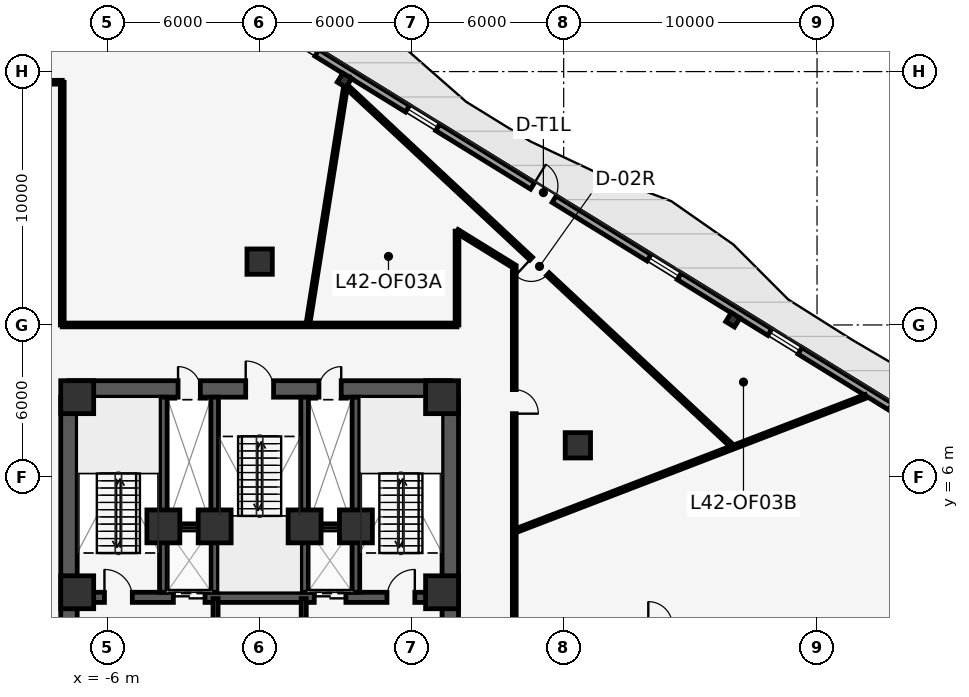
"""IFC4 building model, lengths in metres.
Left out: names, types, materials, properties, quantities, classifications, styles, units other than length and angle.
Written with IfcOpenShell. Run it as: python <this file> out.ifc"""

import sys

from ifc_helpers import new_model, si_unit, direction, frame, frame_2d, origin, origin_2d, place, context, subcontext, project, spatial, rectangle, i_section, extrude, element, fill, save


model = new_model("IFC4")
c1 = context("Model", 3, precision=1e-05, world=origin(), true_north=direction((0.0, 1.0)))
c2 = subcontext(c1, "Body", "Model", "MODEL_VIEW")
j1 = project(units=[si_unit("LENGTHUNIT", "METRE"), si_unit("PLANEANGLEUNIT", "RADIAN")], contexts=[c1])
p1 = place(None, origin())
s1 = spatial("IfcSite", under=j1, at=p1, CompositionType="ELEMENT")
p2 = place(p1, origin())
s2 = spatial("IfcBuilding", under=s1, at=p2, CompositionType="ELEMENT")
p3 = place(p2, frame((0.0, 0.0, 181.9)))
s3 = spatial("IfcBuildingStorey", under=s2, at=p3, CompositionType="ELEMENT", Elevation=181.9)
p4 = place(p3, frame((-7.525, 9.475, 0.0), z_axis=(0.0, 0.0, 1.0), x_axis=(1.0, 0.0, 0.0)))
e1 = element("IfcWall", 1, at=p4, inside=s3, PredefinedType="SHEAR", context=c2, shape_type="SweptSolid", body=[
    extrude(rectangle(XDim=15.05, YDim=0.65, at=frame_2d((7.525, 0.0))), origin(), (0.0, 0.0, 1.0), 3.85),
])
p5 = place(p4, frame((6.975, 0.0, 0.0)))
e2 = element("IfcOpeningElement", 2, at=p5, cuts=e1, PredefinedType="OPENING", context=c2, shape_type="SweptSolid", body=[
    extrude(rectangle(XDim=1.1, YDim=2.15, at=frame_2d((0.55, 1.075))), frame((0.0, 0.335, 0.0), z_axis=(0.0, -1.0, 0.0), x_axis=(1.0, 0.0, 0.0)), (0.0, 0.0, 1.0), 0.67),
])
p6 = place(p4, frame((4.305, 0.0, 0.0)))
e3 = element("IfcOpeningElement", 3, at=p6, cuts=e1, PredefinedType="OPENING", context=c2, shape_type="SweptSolid", body=[
    extrude(rectangle(XDim=0.88, YDim=2.15, at=frame_2d((0.44, 1.075))), frame((0.0, 0.335, 0.0), z_axis=(0.0, -1.0, 0.0), x_axis=(1.0, 0.0, 0.0)), (0.0, 0.0, 1.0), 0.67),
])
p7 = place(p4, frame((9.865, 0.0, 0.0)))
e4 = element("IfcOpeningElement", 4, at=p7, cuts=e1, PredefinedType="OPENING", context=c2, shape_type="SweptSolid", body=[
    extrude(rectangle(XDim=0.88, YDim=2.15, at=frame_2d((0.44, 1.075))), frame((0.0, 0.335, 0.0), z_axis=(0.0, -1.0, 0.0), x_axis=(1.0, 0.0, 0.0)), (0.0, 0.0, 1.0), 0.67),
])
p8 = place(p3, frame((-7.2, 1.25, 0.0), z_axis=(0.0, 0.0, 1.0), x_axis=(1.0, 0.0, 0.0)))
e5 = element("IfcWall", 5, at=p8, inside=s3, PredefinedType="SHEAR", context=c2, shape_type="SweptSolid", body=[
    extrude(rectangle(XDim=14.4, YDim=0.4, at=frame_2d((7.2, 0.0))), origin(), (0.0, 0.0, 1.0), 3.85),
])
p9 = place(p8, frame((3.795, 0.0, 0.0)))
e6 = element("IfcOpeningElement", 6, at=p9, cuts=e5, PredefinedType="OPENING", context=c2, shape_type="SweptSolid", body=[
    extrude(rectangle(XDim=1.25, YDim=2.25, at=frame_2d((0.625, 1.125))), frame((0.0, 0.21, 0.0), z_axis=(0.0, -1.0, 0.0), x_axis=(1.0, 0.0, 0.0)), (0.0, 0.0, 1.0), 0.42),
])
p10 = place(p8, frame((9.355, 0.0, 0.0)))
e7 = element("IfcOpeningElement", 7, at=p10, cuts=e5, PredefinedType="OPENING", context=c2, shape_type="SweptSolid", body=[
    extrude(rectangle(XDim=1.25, YDim=2.25, at=frame_2d((0.625, 1.125))), frame((0.0, 0.21, 0.0), z_axis=(0.0, -1.0, 0.0), x_axis=(1.0, 0.0, 0.0)), (0.0, 0.0, 1.0), 0.42),
])
p11 = place(p8, frame((1.075, 0.0, 0.0)))
e8 = element("IfcOpeningElement", 8, at=p11, cuts=e5, PredefinedType="OPENING", context=c2, shape_type="SweptSolid", body=[
    extrude(rectangle(XDim=1.1, YDim=2.15, at=frame_2d((0.55, 1.075))), frame((0.0, 0.21, 0.0), z_axis=(0.0, -1.0, 0.0), x_axis=(1.0, 0.0, 0.0)), (0.0, 0.0, 1.0), 0.42),
])
p12 = place(p8, frame((12.225, 0.0, 0.0)))
e9 = element("IfcOpeningElement", 9, at=p12, cuts=e5, PredefinedType="OPENING", context=c2, shape_type="SweptSolid", body=[
    extrude(rectangle(XDim=1.1, YDim=2.15, at=frame_2d((0.55, 1.075))), frame((0.0, 0.21, 0.0), z_axis=(0.0, -1.0, 0.0), x_axis=(1.0, 0.0, 0.0)), (0.0, 0.0, 1.0), 0.42),
])
for number, where, z_axis, x_axis in (
    (10, (-3.8, 1.45, 0.0), (0.0, 0.0, 1.0), (0.0, 1.0, 0.0)),
    (11, (-1.775, 1.45, 0.0), (0.0, 0.0, 1.0), (0.0, 1.0, 0.0)),
    (12, (1.775, 1.45, 0.0), (0.0, 0.0, 1.0), (0.0, 1.0, 0.0)),
    (13, (3.8, 1.45, 0.0), (0.0, 0.0, 1.0), (0.0, 1.0, 0.0)),
):
    element("IfcWall", number, at=place(p3, frame(where, z_axis=z_axis, x_axis=x_axis)), inside=s3, PredefinedType="SHEAR", context=c2, shape_type="SweptSolid", body=[
        extrude(rectangle(XDim=7.7, YDim=0.3, at=frame_2d((3.85, 0.0))), origin(), (0.0, 0.0, 1.0), 3.85),
    ])
for number, where, z_axis, x_axis in (
    (14, (-7.525, 0.1, 0.0), (0.0, 0.0, 1.0), (0.0, 1.0, 0.0)),
    (15, (7.525, 0.1, 0.0), (0.0, 0.0, 1.0), (0.0, 1.0, 0.0)),
):
    element("IfcWall", number, at=place(p3, frame(where, z_axis=z_axis, x_axis=x_axis)), inside=s3, PredefinedType="SHEAR", context=c2, shape_type="SweptSolid", body=[
        extrude(rectangle(XDim=9.05, YDim=0.65, at=frame_2d((4.525, 0.0))), origin(), (0.0, 0.0, 1.0), 3.85),
    ])
for number, where, z_axis, x_axis in (
    (16, (7.2, 1.45, 0.0), (0.0, 0.0, 1.0), (1.0, 0.0, 0.0)),
    (17, (7.2, 9.15, 0.0), (0.0, 0.0, 1.0), (1.0, 0.0, 0.0)),
    (18, (-7.2, 9.15, 0.0), (0.0, 0.0, 1.0), (1.0, 0.0, 0.0)),
    (19, (-7.2, 1.45, 0.0), (0.0, 0.0, 1.0), (1.0, 0.0, 0.0)),
    (20, (-3.8, 4.05, 0.0), (0.0, 0.0, 1.0), (1.0, 0.0, 0.0)),
    (21, (3.8, 4.05, 0.0), (0.0, 0.0, 1.0), (1.0, 0.0, 0.0)),
    (22, (-1.775, 4.05, 0.0), (0.0, 0.0, 1.0), (1.0, 0.0, 0.0)),
    (23, (1.775, 4.05, 0.0), (0.0, 0.0, 1.0), (1.0, 0.0, 0.0)),
):
    element("IfcColumn", number, at=place(p3, frame(where, z_axis=z_axis, x_axis=x_axis)), inside=s3, PredefinedType="COLUMN", context=c2, shape_type="SweptSolid", body=[
        extrude(rectangle(XDim=1.3, YDim=1.3, at=origin_2d()), origin(), (0.0, 0.0, 1.0), 4.1),
    ])
for number, where, z_axis, x_axis in (
    (24, (12.56, 7.25, 0.0), (0.0, 0.0, 1.0), (1.0, 0.0, 0.0)),
    (25, (0.0, 14.5, 0.0), (0.0, 0.0, 1.0), (1.0, 0.0, 0.0)),
):
    element("IfcColumn", number, at=place(p3, frame(where, z_axis=z_axis, x_axis=x_axis)), inside=s3, PredefinedType="COLUMN", context=c2, shape_type="SweptSolid", body=[
        extrude(rectangle(XDim=1.0, YDim=1.0, at=origin_2d()), origin(), (0.0, 0.0, 1.0), 4.1),
    ])
for number, where, z_axis, x_axis in (
    (26, (18.679, 12.203, 0.0), (0.0, 0.0, 1.0), (-0.851, 0.525, 0.0)),
    (27, (3.346, 21.655, 0.0), (0.0, 0.0, 1.0), (-0.851, 0.525, 0.0)),
):
    element("IfcColumn", number, at=place(p3, frame(where, z_axis=z_axis, x_axis=x_axis)), inside=s3, PredefinedType="COLUMN", context=c2, shape_type="SweptSolid", body=[
        extrude(i_section(OverallWidth=0.406, OverallDepth=0.417, WebThickness=0.03, FlangeThickness=0.048, at=origin_2d()), origin(), (0.0, 0.0, 1.0), 4.1),
    ])
p13 = place(p3, frame((-12.255, 31.689, 0.0), z_axis=(0.0, 0.0, 1.0), x_axis=(0.851166647402, -0.524895549944, 0.0)))
e28 = element("IfcWall", 28, at=p13, inside=s3, PredefinedType="STANDARD", context=c2, shape_type="SweptSolid", body=[
    extrude(rectangle(XDim=55.111, YDim=0.3, at=frame_2d((27.555, 0.0))), origin(), (0.0, 0.0, 1.0), 3.85),
])
p14 = place(p13, frame((27.055, 0.0, 0.0)))
e29 = element("IfcOpeningElement", 29, at=p14, cuts=e28, PredefinedType="OPENING", context=c2, shape_type="SweptSolid", body=[
    extrude(rectangle(XDim=1.0, YDim=2.15, at=frame_2d((0.5, 1.075))), frame((0.0, 0.16, 0.0), z_axis=(0.0, -1.0, 0.0), x_axis=(1.0, 0.0, 0.0)), (0.0, 0.0, 1.0), 0.32),
])
p15 = place(p13, frame((4.455, 0.0, 0.85)))
e30 = element("IfcOpeningElement", 30, at=p15, cuts=e28, PredefinedType="OPENING", context=c2, shape_type="SweptSolid", body=[
    extrude(rectangle(XDim=1.4, YDim=2.2, at=frame_2d((0.7, 1.1))), frame((0.0, 0.16, 0.0), z_axis=(0.0, -1.0, 0.0), x_axis=(1.0, 0.0, 0.0)), (0.0, 0.0, 1.0), 0.32),
])
p16 = place(p13, frame((10.055, 0.0, 0.85)))
e31 = element("IfcOpeningElement", 31, at=p16, cuts=e28, PredefinedType="OPENING", context=c2, shape_type="SweptSolid", body=[
    extrude(rectangle(XDim=1.4, YDim=2.2, at=frame_2d((0.7, 1.1))), frame((0.0, 0.16, 0.0), z_axis=(0.0, -1.0, 0.0), x_axis=(1.0, 0.0, 0.0)), (0.0, 0.0, 1.0), 0.32),
])
p17 = place(p13, frame((15.655, 0.0, 0.85)))
e32 = element("IfcOpeningElement", 32, at=p17, cuts=e28, PredefinedType="OPENING", context=c2, shape_type="SweptSolid", body=[
    extrude(rectangle(XDim=1.4, YDim=2.2, at=frame_2d((0.7, 1.1))), frame((0.0, 0.16, 0.0), z_axis=(0.0, -1.0, 0.0), x_axis=(1.0, 0.0, 0.0)), (0.0, 0.0, 1.0), 0.32),
])
p18 = place(p13, frame((21.255, 0.0, 0.85)))
e33 = element("IfcOpeningElement", 33, at=p18, cuts=e28, PredefinedType="OPENING", context=c2, shape_type="SweptSolid", body=[
    extrude(rectangle(XDim=1.4, YDim=2.2, at=frame_2d((0.7, 1.1))), frame((0.0, 0.16, 0.0), z_axis=(0.0, -1.0, 0.0), x_axis=(1.0, 0.0, 0.0)), (0.0, 0.0, 1.0), 0.32),
])
p19 = place(p13, frame((32.455, 0.0, 0.85)))
e34 = element("IfcOpeningElement", 34, at=p19, cuts=e28, PredefinedType="OPENING", context=c2, shape_type="SweptSolid", body=[
    extrude(rectangle(XDim=1.4, YDim=2.2, at=frame_2d((0.7, 1.1))), frame((0.0, 0.16, 0.0), z_axis=(0.0, -1.0, 0.0), x_axis=(1.0, 0.0, 0.0)), (0.0, 0.0, 1.0), 0.32),
])
p20 = place(p13, frame((38.055, 0.0, 0.85)))
e35 = element("IfcOpeningElement", 35, at=p20, cuts=e28, PredefinedType="OPENING", context=c2, shape_type="SweptSolid", body=[
    extrude(rectangle(XDim=1.4, YDim=2.2, at=frame_2d((0.7, 1.1))), frame((0.0, 0.16, 0.0), z_axis=(0.0, -1.0, 0.0), x_axis=(1.0, 0.0, 0.0)), (0.0, 0.0, 1.0), 0.32),
])
p21 = place(p13, frame((43.655, 0.0, 0.85)))
e36 = element("IfcOpeningElement", 36, at=p21, cuts=e28, PredefinedType="OPENING", context=c2, shape_type="SweptSolid", body=[
    extrude(rectangle(XDim=1.4, YDim=2.2, at=frame_2d((0.7, 1.1))), frame((0.0, 0.16, 0.0), z_axis=(0.0, -1.0, 0.0), x_axis=(1.0, 0.0, 0.0)), (0.0, 0.0, 1.0), 0.32),
])
p22 = place(p13, frame((49.255, 0.0, 0.85)))
e37 = element("IfcOpeningElement", 37, at=p22, cuts=e28, PredefinedType="OPENING", context=c2, shape_type="SweptSolid", body=[
    extrude(rectangle(XDim=1.4, YDim=2.2, at=frame_2d((0.7, 1.1))), frame((0.0, 0.16, 0.0), z_axis=(0.0, -1.0, 0.0), x_axis=(1.0, 0.0, 0.0)), (0.0, 0.0, 1.0), 0.32),
])
for number, where, z_axis, x_axis in (
    (38, (-3.65, 4.05, 0.0), (0.0, 0.0, 1.0), (1.0, 0.0, 0.0)),
    (39, (1.92, 4.05, 0.0), (0.0, 0.0, 1.0), (1.0, 0.0, 0.0)),
):
    element("IfcWall", number, at=place(p3, frame(where, z_axis=z_axis, x_axis=x_axis)), inside=s3, PredefinedType="PARTITIONING", context=c2, shape_type="SweptSolid", body=[
        extrude(rectangle(XDim=1.73, YDim=0.2, at=frame_2d((0.865, 0.0))), origin(), (0.0, 0.0, 1.0), 3.85),
    ])
p23 = place(p3, frame((-1.74, -1.78, 0.0), z_axis=(0.0, 0.0, 1.0), x_axis=(0.0, 1.0, 0.0)))
e40 = element("IfcWall", 40, at=p23, inside=s3, PredefinedType="PARTITIONING", context=c2, shape_type="SweptSolid", body=[
    extrude(rectangle(XDim=2.98, YDim=0.2, at=frame_2d((1.49, 0.0))), origin(), (0.0, 0.0, 1.0), 3.85),
])
p24 = place(p23, frame((0.89, 0.0, 0.0)))
e41 = element("IfcOpeningElement", 41, at=p24, cuts=e40, PredefinedType="OPENING", context=c2, shape_type="SweptSolid", body=[
    extrude(rectangle(XDim=0.88, YDim=2.15, at=frame_2d((0.44, 1.075))), frame((0.0, 0.11, 0.0), z_axis=(0.0, -1.0, 0.0), x_axis=(1.0, 0.0, 0.0)), (0.0, 0.0, 1.0), 0.22),
])
p25 = place(p3, frame((1.74, -1.78, 0.0), z_axis=(0.0, 0.0, 1.0), x_axis=(0.0, 1.0, 0.0)))
e42 = element("IfcWall", 42, at=p25, inside=s3, PredefinedType="PARTITIONING", context=c2, shape_type="SweptSolid", body=[
    extrude(rectangle(XDim=2.98, YDim=0.2, at=frame_2d((1.49, 0.0))), origin(), (0.0, 0.0, 1.0), 3.85),
])
p26 = place(p3, frame((-10.05, 21.58, 0.0), z_axis=(0.0, 0.0, 1.0), x_axis=(1.0, 0.0, 0.0)))
e43 = element("IfcWall", 43, at=p26, inside=s3, PredefinedType="PARTITIONING", context=c2, shape_type="SweptSolid", body=[
    extrude(rectangle(XDim=2.26, YDim=0.15, at=frame_2d((1.13, 0.0))), origin(), (0.0, 0.0, 1.0), 3.85),
])
p27 = place(p3, frame((-7.79, 21.58, 0.0), z_axis=(0.0, 0.0, 1.0), x_axis=(0.0, -1.0, 0.0)))
e44 = element("IfcWall", 44, at=p27, inside=s3, PredefinedType="PARTITIONING", context=c2, shape_type="SweptSolid", body=[
    extrude(rectangle(XDim=9.58, YDim=0.15, at=frame_2d((4.79, 0.0))), origin(), (0.0, 0.0, 1.0), 3.85),
])
p28 = place(p3, frame((-7.79, 12.0, 0.0), z_axis=(0.0, 0.0, 1.0), x_axis=(1.0, 0.0, 0.0)))
e45 = element("IfcWall", 45, at=p28, inside=s3, PredefinedType="PARTITIONING", context=c2, shape_type="SweptSolid", body=[
    extrude(rectangle(XDim=15.58, YDim=0.15, at=frame_2d((7.79, 0.0))), origin(), (0.0, 0.0, 1.0), 3.85),
])
p29 = place(p3, frame((7.79, 12.0, 0.0), z_axis=(0.0, 0.0, 1.0), x_axis=(0.0, 1.0, 0.0)))
e46 = element("IfcWall", 46, at=p29, inside=s3, PredefinedType="PARTITIONING", context=c2, shape_type="SweptSolid", body=[
    extrude(rectangle(XDim=3.703, YDim=0.15, at=frame_2d((1.852, 0.0))), origin(), (0.0, 0.0, 1.0), 3.85),
])
p30 = place(p3, frame((7.79, 15.703, 0.0), z_axis=(0.0, 0.0, 1.0), x_axis=(0.851190724913, -0.52485650403, 0.0)))
e47 = element("IfcWall", 47, at=p30, inside=s3, PredefinedType="PARTITIONING", context=c2, shape_type="SweptSolid", body=[
    extrude(rectangle(XDim=2.655, YDim=0.15, at=frame_2d((1.328, 0.0))), origin(), (0.0, 0.0, 1.0), 3.85),
])
p31 = place(p3, frame((10.05, 14.31, 0.0), z_axis=(0.0, 0.0, 1.0), x_axis=(0.0, -1.0, 0.0)))
e48 = element("IfcWall", 48, at=p31, inside=s3, PredefinedType="PARTITIONING", context=c2, shape_type="SweptSolid", body=[
    extrude(rectangle(XDim=14.18, YDim=0.15, at=frame_2d((7.09, 0.0))), origin(), (0.0, 0.0, 1.0), 3.85),
])
p32 = place(p31, frame((4.861, 0.0, 0.0)))
e49 = element("IfcOpeningElement", 49, at=p32, cuts=e48, PredefinedType="OPENING", context=c2, shape_type="SweptSolid", body=[
    extrude(rectangle(XDim=0.95, YDim=2.15, at=frame_2d((0.475, 1.075))), frame((0.0, 0.085, 0.0), z_axis=(0.0, -1.0, 0.0), x_axis=(1.0, 0.0, 0.0)), (0.0, 0.0, 1.0), 0.17),
])
p33 = place(p3, frame((10.155, 3.898, 0.0), z_axis=(0.0, 0.0, 1.0), x_axis=(0.933582173368, 0.358363398759, 0.0)))
e50 = element("IfcWall", 50, at=p33, inside=s3, PredefinedType="PARTITIONING", context=c2, shape_type="SweptSolid", body=[
    extrude(rectangle(XDim=14.75, YDim=0.15, at=frame_2d((7.375, 0.0))), origin(), (0.0, 0.0, 1.0), 3.85),
])
p34 = place(p3, frame((1.917, 12.105, 0.0), z_axis=(0.0, 0.0, 1.0), x_axis=(0.156446237386, 0.987686475967, 0.0)))
e51 = element("IfcWall", 51, at=p34, inside=s3, PredefinedType="PARTITIONING", context=c2, shape_type="SweptSolid", body=[
    extrude(rectangle(XDim=9.823, YDim=0.15, at=frame_2d((4.912, 0.0))), origin(), (0.0, 0.0, 1.0), 3.85),
])
p35 = place(p3, frame((18.675, 7.196, 0.0), z_axis=(0.0, 0.0, 1.0), x_axis=(-0.731248253025, 0.682111422312, 0.0)))
e52 = element("IfcWall", 52, at=p35, inside=s3, PredefinedType="PARTITIONING", context=c2, shape_type="SweptSolid", body=[
    extrude(rectangle(XDim=20.863, YDim=0.15, at=frame_2d((10.432, 0.0))), origin(), (0.0, 0.0, 1.0), 3.85),
])
p36 = place(p35, frame((9.982, 0.0, 0.0)))
e53 = element("IfcOpeningElement", 53, at=p36, cuts=e52, PredefinedType="OPENING", context=c2, shape_type="SweptSolid", body=[
    extrude(rectangle(XDim=0.9, YDim=2.1, at=frame_2d((0.45, 1.05))), frame((0.0, 0.085, 0.0), z_axis=(0.0, -1.0, 0.0), x_axis=(1.0, 0.0, 0.0)), (0.0, 0.0, 1.0), 0.17),
])
p37 = place(p14, origin())
e54 = element("IfcDoor", 54, at=p37, inside=s3, OperationType="SINGLE_SWING_LEFT", PredefinedType="DOOR", context=c2, shape_type="SweptSolid", body=[
    extrude(rectangle(XDim=1.0, YDim=2.15, at=frame_2d((0.5, 1.075))), frame((0.0, 0.025, 0.0), z_axis=(0.0, -1.0, 0.0), x_axis=(1.0, 0.0, 0.0)), (0.0, 0.0, 1.0), 0.05),
])
fill(e29, e54)
p38 = place(p17, origin())
e55 = element("IfcWindow", 55, at=p38, inside=s3, PartitioningType="SINGLE_PANEL", PredefinedType="WINDOW", context=c2, shape_type="SweptSolid", body=[
    extrude(rectangle(XDim=1.4, YDim=2.2, at=frame_2d((0.7, 1.1))), frame((0.0, 0.03, 0.0), z_axis=(0.0, -1.0, 0.0), x_axis=(1.0, 0.0, 0.0)), (0.0, 0.0, 1.0), 0.06),
])
fill(e32, e55)
p39 = place(p18, origin())
e56 = element("IfcWindow", 56, at=p39, inside=s3, PartitioningType="SINGLE_PANEL", PredefinedType="WINDOW", context=c2, shape_type="SweptSolid", body=[
    extrude(rectangle(XDim=1.4, YDim=2.2, at=frame_2d((0.7, 1.1))), frame((0.0, 0.03, 0.0), z_axis=(0.0, -1.0, 0.0), x_axis=(1.0, 0.0, 0.0)), (0.0, 0.0, 1.0), 0.06),
])
fill(e33, e56)
p40 = place(p19, origin())
e57 = element("IfcWindow", 57, at=p40, inside=s3, PartitioningType="SINGLE_PANEL", PredefinedType="WINDOW", context=c2, shape_type="SweptSolid", body=[
    extrude(rectangle(XDim=1.4, YDim=2.2, at=frame_2d((0.7, 1.1))), frame((0.0, 0.03, 0.0), z_axis=(0.0, -1.0, 0.0), x_axis=(1.0, 0.0, 0.0)), (0.0, 0.0, 1.0), 0.06),
])
fill(e34, e57)
p41 = place(p20, origin())
e58 = element("IfcWindow", 58, at=p41, inside=s3, PartitioningType="SINGLE_PANEL", PredefinedType="WINDOW", context=c2, shape_type="SweptSolid", body=[
    extrude(rectangle(XDim=1.4, YDim=2.2, at=frame_2d((0.7, 1.1))), frame((0.0, 0.03, 0.0), z_axis=(0.0, -1.0, 0.0), x_axis=(1.0, 0.0, 0.0)), (0.0, 0.0, 1.0), 0.06),
])
fill(e35, e58)
p42 = place(p9, origin())
e59 = element("IfcDoor", 59, at=p42, inside=s3, OperationType="DOUBLE_DOOR_SLIDING", PredefinedType="DOOR", context=c2, shape_type="SweptSolid", body=[
    extrude(rectangle(XDim=1.25, YDim=2.25, at=frame_2d((0.625, 1.125))), frame((0.0, 0.025, 0.0), z_axis=(0.0, -1.0, 0.0), x_axis=(1.0, 0.0, 0.0)), (0.0, 0.0, 1.0), 0.05),
])
fill(e6, e59)
p43 = place(p10, origin())
e60 = element("IfcDoor", 60, at=p43, inside=s3, OperationType="DOUBLE_DOOR_SLIDING", PredefinedType="DOOR", context=c2, shape_type="SweptSolid", body=[
    extrude(rectangle(XDim=1.25, YDim=2.25, at=frame_2d((0.625, 1.125))), frame((0.0, 0.025, 0.0), z_axis=(0.0, -1.0, 0.0), x_axis=(1.0, 0.0, 0.0)), (0.0, 0.0, 1.0), 0.05),
])
fill(e7, e60)
p44 = place(p11, origin())
e61 = element("IfcDoor", 61, at=p44, inside=s3, OperationType="SINGLE_SWING_LEFT", PredefinedType="DOOR", context=c2, shape_type="SweptSolid", body=[
    extrude(rectangle(XDim=1.1, YDim=2.15, at=frame_2d((0.55, 1.075))), frame((0.0, 0.025, 0.0), z_axis=(0.0, -1.0, 0.0), x_axis=(1.0, 0.0, 0.0)), (0.0, 0.0, 1.0), 0.05),
])
fill(e8, e61)
p45 = place(p12, origin())
e62 = element("IfcDoor", 62, at=p45, inside=s3, OperationType="SINGLE_SWING_RIGHT", PredefinedType="DOOR", context=c2, shape_type="SweptSolid", body=[
    extrude(rectangle(XDim=1.1, YDim=2.15, at=frame_2d((0.55, 1.075))), frame((0.0, 0.025, 0.0), z_axis=(0.0, -1.0, 0.0), x_axis=(1.0, 0.0, 0.0)), (0.0, 0.0, 1.0), 0.05),
])
fill(e9, e62)
p46 = place(p5, origin())
e63 = element("IfcDoor", 63, at=p46, inside=s3, OperationType="SINGLE_SWING_LEFT", PredefinedType="DOOR", context=c2, shape_type="SweptSolid", body=[
    extrude(rectangle(XDim=1.1, YDim=2.15, at=frame_2d((0.55, 1.075))), frame((0.0, 0.025, 0.0), z_axis=(0.0, -1.0, 0.0), x_axis=(1.0, 0.0, 0.0)), (0.0, 0.0, 1.0), 0.05),
])
fill(e2, e63)
p47 = place(p6, origin())
e64 = element("IfcDoor", 64, at=p47, inside=s3, OperationType="SINGLE_SWING_LEFT", PredefinedType="DOOR", context=c2, shape_type="SweptSolid", body=[
    extrude(rectangle(XDim=0.88, YDim=2.15, at=frame_2d((0.44, 1.075))), frame((0.0, 0.025, 0.0), z_axis=(0.0, -1.0, 0.0), x_axis=(1.0, 0.0, 0.0)), (0.0, 0.0, 1.0), 0.05),
])
fill(e3, e64)
p48 = place(p7, origin())
e65 = element("IfcDoor", 65, at=p48, inside=s3, OperationType="SINGLE_SWING_RIGHT", PredefinedType="DOOR", context=c2, shape_type="SweptSolid", body=[
    extrude(rectangle(XDim=0.88, YDim=2.15, at=frame_2d((0.44, 1.075))), frame((0.0, 0.025, 0.0), z_axis=(0.0, -1.0, 0.0), x_axis=(1.0, 0.0, 0.0)), (0.0, 0.0, 1.0), 0.05),
])
fill(e4, e65)
p49 = place(p36, origin())
e66 = element("IfcDoor", 66, at=p49, inside=s3, OperationType="SINGLE_SWING_RIGHT", PredefinedType="DOOR", context=c2, shape_type="SweptSolid", body=[
    extrude(rectangle(XDim=0.9, YDim=2.1, at=frame_2d((0.45, 1.05))), frame((0.0, 0.025, 0.0), z_axis=(0.0, -1.0, 0.0), x_axis=(1.0, 0.0, 0.0)), (0.0, 0.0, 1.0), 0.05),
])
fill(e53, e66)
p50 = place(p32, origin())
e67 = element("IfcDoor", 67, at=p50, inside=s3, OperationType="SINGLE_SWING_RIGHT", PredefinedType="DOOR", context=c2, shape_type="SweptSolid", body=[
    extrude(rectangle(XDim=0.95, YDim=2.15, at=frame_2d((0.475, 1.075))), frame((0.0, 0.025, 0.0), z_axis=(0.0, -1.0, 0.0), x_axis=(1.0, 0.0, 0.0)), (0.0, 0.0, 1.0), 0.05),
])
fill(e49, e67)
save(model, sys.argv[1])
